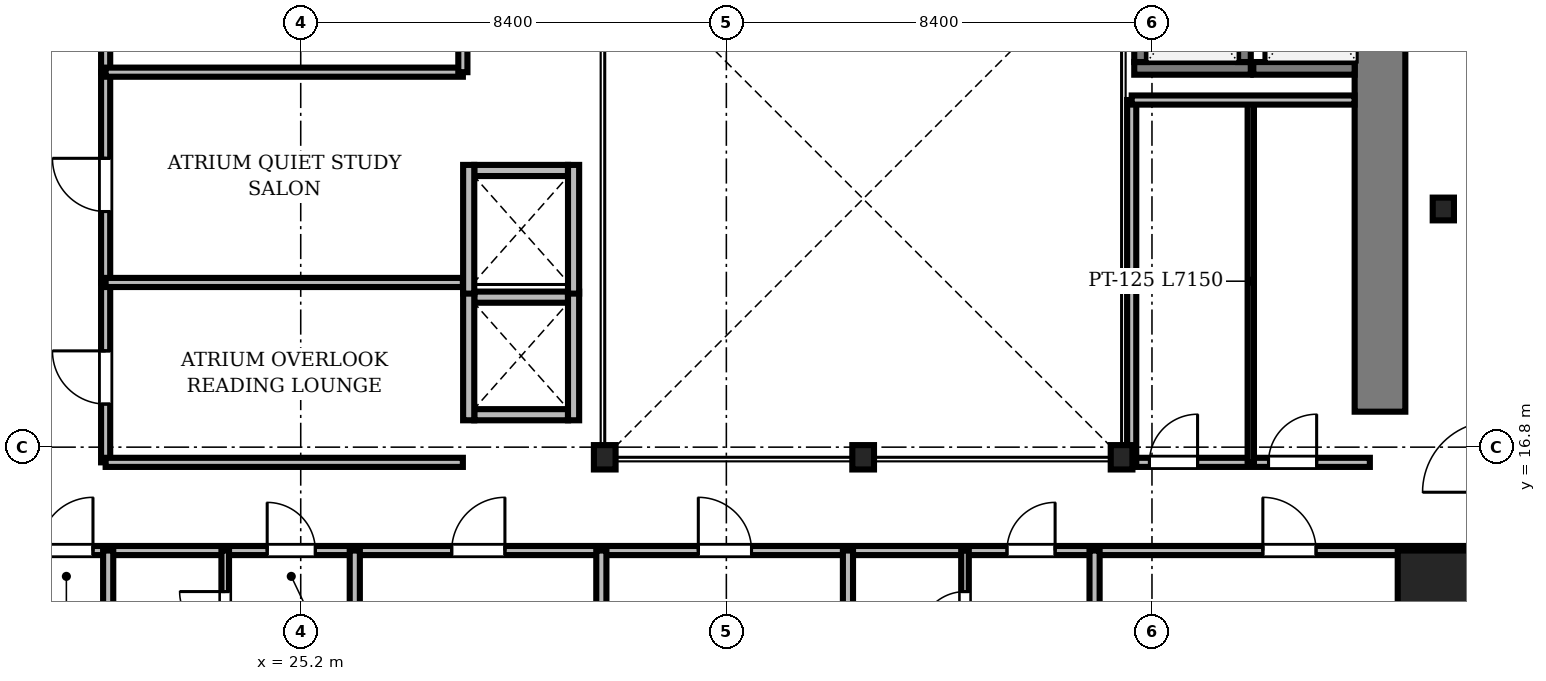
"""IFC4 building model, lengths in metres.
Left out: names, types, materials, properties, quantities, classifications, styles, units other than length and angle.
Written with IfcOpenShell. Run it as: python <this file> out.ifc"""

import sys

from ifc_helpers import new_model, si_unit, direction, frame, frame_2d, origin, origin_2d, place, context, subcontext, project, spatial, rectangle, i_section, extrude, source, transform, mapped, element, fill, save


model = new_model("IFC4")
c1 = context("Model", 3, precision=1e-05, world=origin(), true_north=direction((0.0, 1.0)))
c2 = subcontext(c1, "Body", "Model", "MODEL_VIEW")
j1 = project(units=[si_unit("LENGTHUNIT", "METRE"), si_unit("PLANEANGLEUNIT", "RADIAN")], contexts=[c1])
p1 = place(None, origin())
s1 = spatial("IfcSite", under=j1, at=p1, CompositionType="ELEMENT")
p2 = place(p1, origin())
s2 = spatial("IfcBuilding", under=s1, at=p2, CompositionType="ELEMENT")
p3 = place(p2, frame((0.0, 0.0, 45.85)))
s3 = spatial("IfcBuildingStorey", under=s2, at=p3, CompositionType="ELEMENT", Elevation=45.85)
m1 = source(origin(), c2, "Body", "SweptSolid", [
    extrude(rectangle(XDim=13.15, YDim=1.0, at=frame_2d((6.575, 0.0))), origin(), (0.0, 0.0, 1.0), 3.41),
])
p4 = place(p3, frame((46.5, 17.5, 0.0), z_axis=(0.0, 0.0, 1.0), x_axis=(0.0, 1.0, 0.0)))
e1 = element("IfcWall", 1, at=p4, inside=s3, PredefinedType="SHEAR", context=c2, shape_type="MappedRepresentation", body=[
    mapped(m1, transform((0.0, 0.0, 0.0), scale=1.0)),
])
m2 = source(origin(), c2, "Body", "SweptSolid", [
    extrude(i_section(OverallWidth=0.428, OverallDepth=0.481, WebThickness=0.04, FlangeThickness=0.063, FilletRadius=0.015, at=origin_2d()), origin(), (0.0, 0.0, 1.0), 3.41),
])
for number, where, z_axis, x_axis in (
    (2, (31.2, 16.6, 0.0), (0.0, 0.0, 1.0), (1.0, 0.0, 0.0)),
    (3, (36.3, 16.6, 0.0), (0.0, 0.0, 1.0), (1.0, 0.0, 0.0)),
    (4, (41.4, 16.6, 0.0), (0.0, 0.0, 1.0), (1.0, 0.0, 0.0)),
):
    element("IfcColumn", number, at=place(p3, frame(where, z_axis=z_axis, x_axis=x_axis)), inside=s3, PredefinedType="COLUMN", context=c2, shape_type="MappedRepresentation", body=[
        mapped(m2, transform((0.0, 0.0, 0.0), scale=1.0)),
    ])
m3 = source(origin(), c2, "Body", "SweptSolid", [
    extrude(rectangle(XDim=1.8, YDim=1.8, at=origin_2d()), origin(), (0.0, 0.0, 1.0), 3.41),
])
p5 = place(p3, frame((47.75, 13.86, 0.0), z_axis=(0.0, 0.0, 1.0), x_axis=(1.0, 0.0, 0.0)))
e5 = element("IfcColumn", 5, at=p5, inside=s3, PredefinedType="COLUMN", context=c2, shape_type="MappedRepresentation", body=[
    mapped(m3, transform((0.0, 0.0, 0.0), scale=1.0)),
])
m4 = source(origin(), c2, "Body", "SweptSolid", [
    extrude(i_section(OverallWidth=0.419, OverallDepth=0.449, WebThickness=0.031, FlangeThickness=0.048, FilletRadius=0.015, at=origin_2d()), origin(), (0.0, 0.0, 1.0), 3.41),
])
p6 = place(p3, frame((47.75, 21.5, 0.0), z_axis=(0.0, 0.0, 1.0), x_axis=(1.0, 0.0, 0.0)))
e6 = element("IfcColumn", 6, at=p6, inside=s3, PredefinedType="COLUMN", context=c2, shape_type="MappedRepresentation", body=[
    mapped(m4, transform((0.0, 0.0, 0.0), scale=1.0)),
])
m5 = source(origin(), c2, "Body", "SweptSolid", [
    extrude(rectangle(XDim=1.85, YDim=0.22, at=frame_2d((0.925, 0.0))), origin(), (0.0, 0.0, 1.0), 3.41),
])
for number, where, z_axis, x_axis in (
    (7, (28.625, 17.44, 0.0), (0.0, 0.0, 1.0), (1.0, 0.0, 0.0)),
    (8, (28.625, 19.76, 0.0), (0.0, 0.0, 1.0), (1.0, 0.0, 0.0)),
):
    element("IfcWall", number, at=place(p3, frame(where, z_axis=z_axis, x_axis=x_axis)), inside=s3, PredefinedType="SOLIDWALL", context=c2, shape_type="MappedRepresentation", body=[
        mapped(m5, transform((0.0, 0.0, 0.0), scale=1.0)),
    ])
m6 = source(origin(), c2, "Body", "SweptSolid", [
    extrude(rectangle(XDim=2.54, YDim=0.22, at=frame_2d((1.27, 0.0))), origin(), (0.0, 0.0, 1.0), 3.41),
])
for number, where, z_axis, x_axis in (
    (9, (28.515, 17.33, 0.0), (0.0, 0.0, 1.0), (0.0, 1.0, 0.0)),
    (10, (30.585, 17.33, 0.0), (0.0, 0.0, 1.0), (0.0, 1.0, 0.0)),
):
    element("IfcWall", number, at=place(p3, frame(where, z_axis=z_axis, x_axis=x_axis)), inside=s3, PredefinedType="SOLIDWALL", context=c2, shape_type="MappedRepresentation", body=[
        mapped(m6, transform((0.0, 0.0, 0.0), scale=1.0)),
    ])
p7 = place(p3, frame((28.625, 22.26, 0.0), z_axis=(0.0, 0.0, 1.0), x_axis=(1.0, 0.0, 0.0)))
e11 = element("IfcWall", 11, at=p7, inside=s3, PredefinedType="SOLIDWALL", context=c2, shape_type="MappedRepresentation", body=[
    mapped(m5, transform((0.0, 0.0, 0.0), scale=1.0)),
])
for number, where, z_axis, x_axis in (
    (12, (28.515, 19.83, 0.0), (0.0, 0.0, 1.0), (0.0, 1.0, 0.0)),
    (13, (30.585, 19.83, 0.0), (0.0, 0.0, 1.0), (0.0, 1.0, 0.0)),
):
    element("IfcWall", number, at=place(p3, frame(where, z_axis=z_axis, x_axis=x_axis)), inside=s3, PredefinedType="SOLIDWALL", context=c2, shape_type="MappedRepresentation", body=[
        mapped(m6, transform((0.0, 0.0, 0.0), scale=1.0)),
    ])
m7 = source(origin(), c2, "Body", "SweptSolid", [
    extrude(rectangle(XDim=2.3, YDim=0.25, at=frame_2d((1.15, 0.0))), origin(), (0.0, 0.0, 1.0), 3.41),
])
for number, where, z_axis, x_axis in (
    (14, (41.65, 24.275, 0.0), (0.0, 0.0, 1.0), (1.0, 0.0, 0.0)),
    (15, (41.775, 24.4, 0.0), (0.0, 0.0, 1.0), (0.0, 1.0, 0.0)),
    (16, (43.825, 24.4, 0.0), (0.0, 0.0, 1.0), (0.0, 1.0, 0.0)),
):
    element("IfcWall", number, at=place(p3, frame(where, z_axis=z_axis, x_axis=x_axis)), inside=s3, PredefinedType="SOLIDWALL", context=c2, shape_type="MappedRepresentation", body=[
        mapped(m7, transform((0.0, 0.0, 0.0), scale=1.0)),
    ])
m8 = source(origin(), c2, "Body", "SweptSolid", [
    extrude(rectangle(XDim=2.0, YDim=0.25, at=frame_2d((1.0, 0.0))), origin(), (0.0, 0.0, 1.0), 3.41),
])
p8 = place(p3, frame((44.0, 24.275, 0.0), z_axis=(0.0, 0.0, 1.0), x_axis=(1.0, 0.0, 0.0)))
e17 = element("IfcWall", 17, at=p8, inside=s3, PredefinedType="SOLIDWALL", context=c2, shape_type="MappedRepresentation", body=[
    mapped(m8, transform((0.0, 0.0, 0.0), scale=1.0)),
])
m9 = source(origin(), c2, "Body", "SweptSolid", [
    extrude(rectangle(XDim=46.156, YDim=0.18, at=frame_2d((23.078, 0.0))), origin(), (0.0, 0.0, 1.0), 2.652),
])
p9 = place(p3, frame((2.422, 14.76, 0.0), z_axis=(0.0, 0.0, 1.0), x_axis=(1.0, 0.0, 0.0)))
e18 = element("IfcWall", 18, at=p9, inside=s3, PredefinedType="PARTITIONING", context=c2, shape_type="MappedRepresentation", body=[
    mapped(m9, transform((0.0, 0.0, 0.0), scale=1.0)),
])
m10 = source(origin(), c2, "Body", "SweptSolid", [
    extrude(rectangle(XDim=1.05, YDim=2.2, at=frame_2d((0.525, 1.1))), frame((0.0, 0.1, 0.0), z_axis=(0.0, -1.0, 0.0), x_axis=(1.0, 0.0, 0.0)), (0.0, 0.0, 1.0), 0.2),
])
p10 = place(p9, frame((17.628, 0.0, 0.0)))
e19 = element("IfcOpeningElement", 19, at=p10, cuts=e18, PredefinedType="OPENING", context=c2, shape_type="MappedRepresentation", body=[
    mapped(m10, transform((0.0, 0.0, 0.0), scale=1.0)),
])
m11 = source(origin(), c2, "Body", "SweptSolid", [
    extrude(rectangle(XDim=0.95, YDim=2.15, at=frame_2d((0.475, 1.075))), frame((0.0, 0.1, 0.0), z_axis=(0.0, -1.0, 0.0), x_axis=(1.0, 0.0, 0.0)), (0.0, 0.0, 1.0), 0.2),
])
p11 = place(p9, frame((22.116, 0.0, 0.0)))
e20 = element("IfcOpeningElement", 20, at=p11, cuts=e18, PredefinedType="OPENING", context=c2, shape_type="MappedRepresentation", body=[
    mapped(m11, transform((0.0, 0.0, 0.0), scale=1.0)),
])
p12 = place(p9, frame((25.758, 0.0, 0.0)))
e21 = element("IfcOpeningElement", 21, at=p12, cuts=e18, PredefinedType="OPENING", context=c2, shape_type="MappedRepresentation", body=[
    mapped(m10, transform((0.0, 0.0, 0.0), scale=1.0)),
])
p13 = place(p9, frame((30.625, 0.0, 0.0)))
e22 = element("IfcOpeningElement", 22, at=p13, cuts=e18, PredefinedType="OPENING", context=c2, shape_type="MappedRepresentation", body=[
    mapped(m10, transform((0.0, 0.0, 0.0), scale=1.0)),
])
p14 = place(p9, frame((36.716, 0.0, 0.0)))
e23 = element("IfcOpeningElement", 23, at=p14, cuts=e18, PredefinedType="OPENING", context=c2, shape_type="MappedRepresentation", body=[
    mapped(m11, transform((0.0, 0.0, 0.0), scale=1.0)),
])
p15 = place(p9, frame((41.766, 0.0, 0.0)))
e24 = element("IfcOpeningElement", 24, at=p15, cuts=e18, PredefinedType="OPENING", context=c2, shape_type="MappedRepresentation", body=[
    mapped(m10, transform((0.0, 0.0, 0.0), scale=1.0)),
])
m12 = source(origin(), c2, "Body", "SweptSolid", [
    extrude(rectangle(XDim=4.7, YDim=0.18, at=frame_2d((2.35, 0.0))), origin(), (0.0, 0.0, 1.0), 2.802),
])
p16 = place(p3, frame((41.6, 16.5, 0.0), z_axis=(0.0, 0.0, 1.0), x_axis=(1.0, 0.0, 0.0)))
e25 = element("IfcWall", 25, at=p16, inside=s3, PredefinedType="PARTITIONING", context=c2, shape_type="MappedRepresentation", body=[
    mapped(m12, transform((0.0, 0.0, 0.0), scale=1.0)),
])
p17 = place(p16, frame((0.35, 0.0, 0.0)))
e26 = element("IfcOpeningElement", 26, at=p17, cuts=e25, PredefinedType="OPENING", context=c2, shape_type="MappedRepresentation", body=[
    mapped(m11, transform((0.0, 0.0, 0.0), scale=1.0)),
])
p18 = place(p16, frame((2.7, 0.0, 0.0)))
e27 = element("IfcOpeningElement", 27, at=p18, cuts=e25, PredefinedType="OPENING", context=c2, shape_type="MappedRepresentation", body=[
    mapped(m11, transform((0.0, 0.0, 0.0), scale=1.0)),
])
m13 = source(origin(), c2, "Body", "SweptSolid", [
    extrude(rectangle(XDim=4.24, YDim=0.18, at=frame_2d((2.12, 0.0))), origin(), (0.0, 0.0, 1.0), 2.802),
])
p19 = place(p3, frame((21.35, 24.2, 0.0), z_axis=(0.0, 0.0, 1.0), x_axis=(0.0, 1.0, 0.0)))
e28 = element("IfcWall", 28, at=p19, inside=s3, PredefinedType="PARTITIONING", context=c2, shape_type="MappedRepresentation", body=[
    mapped(m13, transform((0.0, 0.0, 0.0), scale=1.0)),
])
p20 = place(p19, frame((1.4, 0.0, 0.0)))
e29 = element("IfcOpeningElement", 29, at=p20, cuts=e28, PredefinedType="OPENING", context=c2, shape_type="MappedRepresentation", body=[
    mapped(m10, transform((0.0, 0.0, 0.0), scale=1.0)),
])
m14 = source(origin(), c2, "Body", "SweptSolid", [
    extrude(rectangle(XDim=4.15, YDim=0.18, at=frame_2d((2.075, 0.0))), origin(), (0.0, 0.0, 1.0), 3.042),
])
p21 = place(p3, frame((21.35, 20.05, 0.0), z_axis=(0.0, 0.0, 1.0), x_axis=(0.0, 1.0, 0.0)))
e30 = element("IfcWall", 30, at=p21, inside=s3, PredefinedType="PARTITIONING", context=c2, shape_type="MappedRepresentation", body=[
    mapped(m14, transform((0.0, 0.0, 0.0), scale=1.0)),
])
p22 = place(p21, frame((1.4, 0.0, 0.0)))
e31 = element("IfcOpeningElement", 31, at=p22, cuts=e30, PredefinedType="OPENING", context=c2, shape_type="MappedRepresentation", body=[
    mapped(m10, transform((0.0, 0.0, 0.0), scale=1.0)),
])
m15 = source(origin(), c2, "Body", "SweptSolid", [
    extrude(rectangle(XDim=3.55, YDim=0.18, at=frame_2d((1.775, 0.0))), origin(), (0.0, 0.0, 1.0), 2.802),
])
p23 = place(p3, frame((21.35, 16.5, 0.0), z_axis=(0.0, 0.0, 1.0), x_axis=(0.0, 1.0, 0.0)))
e32 = element("IfcWall", 32, at=p23, inside=s3, PredefinedType="PARTITIONING", context=c2, shape_type="MappedRepresentation", body=[
    mapped(m15, transform((0.0, 0.0, 0.0), scale=1.0)),
])
p24 = place(p23, frame((1.15, 0.0, 0.0)))
e33 = element("IfcOpeningElement", 33, at=p24, cuts=e32, PredefinedType="OPENING", context=c2, shape_type="MappedRepresentation", body=[
    mapped(m10, transform((0.0, 0.0, 0.0), scale=1.0)),
])
m16 = source(origin(), c2, "Body", "SweptSolid", [
    extrude(rectangle(XDim=2.36, YDim=0.15, at=frame_2d((1.18, 0.0))), origin(), (0.0, 0.0, 1.0), 3.41),
])
p25 = place(p3, frame((23.71, 12.4, 0.0), z_axis=(0.0, 0.0, 1.0), x_axis=(0.0, 1.0, 0.0)))
e34 = element("IfcWall", 34, at=p25, inside=s3, PredefinedType="PARTITIONING", context=c2, shape_type="MappedRepresentation", body=[
    mapped(m16, transform((0.0, 0.0, 0.0), scale=1.0)),
])
m17 = source(origin(), c2, "Body", "SweptSolid", [
    extrude(rectangle(XDim=0.9, YDim=2.1, at=frame_2d((0.45, 1.05))), frame((0.0, 0.085, 0.0), z_axis=(0.0, -1.0, 0.0), x_axis=(1.0, 0.0, 0.0)), (0.0, 0.0, 1.0), 0.17),
])
p26 = place(p25, frame((0.65, 0.0, 0.0)))
e35 = element("IfcOpeningElement", 35, at=p26, cuts=e34, PredefinedType="OPENING", context=c2, shape_type="MappedRepresentation", body=[
    mapped(m17, transform((0.0, 0.0, 0.0), scale=1.0)),
])
p27 = place(p3, frame((38.31, 12.4, 0.0), z_axis=(0.0, 0.0, 1.0), x_axis=(0.0, 1.0, 0.0)))
e36 = element("IfcWall", 36, at=p27, inside=s3, PredefinedType="PARTITIONING", context=c2, shape_type="MappedRepresentation", body=[
    mapped(m16, transform((0.0, 0.0, 0.0), scale=1.0)),
])
p28 = place(p27, frame((0.65, 0.0, 0.0)))
e37 = element("IfcOpeningElement", 37, at=p28, cuts=e36, PredefinedType="OPENING", context=c2, shape_type="MappedRepresentation", body=[
    mapped(m17, transform((0.0, 0.0, 0.0), scale=1.0)),
])
m18 = source(origin(), c2, "Body", "SweptSolid", [
    extrude(rectangle(XDim=12.638, YDim=0.2, at=frame_2d((6.319, 0.0))), origin(), (0.0, 0.0, 1.0), 2.652),
])
p29 = place(p3, frame((21.4, 2.122, 0.0), z_axis=(0.0, 0.0, 1.0), x_axis=(0.0, 1.0, 0.0)))
e38 = element("IfcWall", 38, at=p29, inside=s3, PredefinedType="PARTITIONING", context=c2, shape_type="MappedRepresentation", body=[
    mapped(m18, transform((0.0, 0.0, 0.0), scale=1.0)),
])
m19 = source(origin(), c2, "Body", "SweptSolid", [
    extrude(rectangle(XDim=12.83, YDim=0.2, at=frame_2d((6.415, 0.0))), origin(), (0.0, 0.0, 1.0), 2.652),
])
p30 = place(p3, frame((26.267, 1.93, 0.0), z_axis=(0.0, 0.0, 1.0), x_axis=(0.0, 1.0, 0.0)))
e39 = element("IfcWall", 39, at=p30, inside=s3, PredefinedType="PARTITIONING", context=c2, shape_type="MappedRepresentation", body=[
    mapped(m19, transform((0.0, 0.0, 0.0), scale=1.0)),
])
for number, where, z_axis, x_axis in (
    (40, (31.133, 2.122, 0.0), (0.0, 0.0, 1.0), (0.0, 1.0, 0.0)),
    (41, (36.0, 2.122, 0.0), (0.0, 0.0, 1.0), (0.0, 1.0, 0.0)),
    (42, (40.867, 2.122, 0.0), (0.0, 0.0, 1.0), (0.0, 1.0, 0.0)),
):
    element("IfcWall", number, at=place(p3, frame(where, z_axis=z_axis, x_axis=x_axis)), inside=s3, PredefinedType="PARTITIONING", context=c2, shape_type="MappedRepresentation", body=[
        mapped(m18, transform((0.0, 0.0, 0.0), scale=1.0)),
    ])
m20 = source(origin(), c2, "Body", "SweptSolid", [
    extrude(rectangle(XDim=7.15, YDim=0.18, at=frame_2d((3.575, 0.0))), origin(), (0.0, 0.0, 1.0), 2.802),
])
p31 = place(p3, frame((41.6, 16.5, 0.0), z_axis=(0.0, 0.0, 1.0), x_axis=(0.0, 1.0, 0.0)))
e43 = element("IfcWall", 43, at=p31, inside=s3, PredefinedType="PARTITIONING", context=c2, shape_type="MappedRepresentation", body=[
    mapped(m20, transform((0.0, 0.0, 0.0), scale=1.0)),
])
m21 = source(origin(), c2, "Body", "SweptSolid", [
    extrude(rectangle(XDim=7.15, YDim=0.125, at=frame_2d((3.575, 0.0))), origin(), (0.0, 0.0, 1.0), 2.802),
])
p32 = place(p3, frame((43.95, 16.5, 0.0), z_axis=(0.0, 0.0, 1.0), x_axis=(0.0, 1.0, 0.0)))
e44 = element("IfcWall", 44, at=p32, inside=s3, PredefinedType="PARTITIONING", context=c2, shape_type="MappedRepresentation", body=[
    mapped(m21, transform((0.0, 0.0, 0.0), scale=1.0)),
])
m22 = source(origin(), c2, "Body", "SweptSolid", [
    extrude(rectangle(XDim=7.05, YDim=0.18, at=frame_2d((3.525, 0.0))), origin(), (0.0, 0.0, 1.0), 2.802),
])
p33 = place(p3, frame((21.35, 16.5, 0.0), z_axis=(0.0, 0.0, 1.0), x_axis=(1.0, 0.0, 0.0)))
e45 = element("IfcWall", 45, at=p33, inside=s3, PredefinedType="PARTITIONING", context=c2, shape_type="MappedRepresentation", body=[
    mapped(m22, transform((0.0, 0.0, 0.0), scale=1.0)),
])
m23 = source(origin(), c2, "Body", "SweptSolid", [
    extrude(rectangle(XDim=7.05, YDim=0.18, at=frame_2d((3.525, 0.0))), origin(), (0.0, 0.0, 1.0), 3.41),
])
for number, where, z_axis, x_axis in (
    (46, (21.35, 20.05, 0.0), (0.0, 0.0, 1.0), (1.0, 0.0, 0.0)),
    (47, (21.35, 24.2, 0.0), (0.0, 0.0, 1.0), (1.0, 0.0, 0.0)),
):
    element("IfcWall", number, at=place(p3, frame(where, z_axis=z_axis, x_axis=x_axis)), inside=s3, PredefinedType="PARTITIONING", context=c2, shape_type="MappedRepresentation", body=[
        mapped(m23, transform((0.0, 0.0, 0.0), scale=1.0)),
    ])
m24 = source(origin(), c2, "Body", "SweptSolid", [
    extrude(rectangle(XDim=4.398, YDim=0.18, at=frame_2d((2.199, 0.0))), origin(), (0.0, 0.0, 1.0), 3.41),
])
p34 = place(p3, frame((41.6, 23.65, 0.0), z_axis=(0.0, 0.0, 1.0), x_axis=(1.0, 0.0, 0.0)))
e48 = element("IfcWall", 48, at=p34, inside=s3, PredefinedType="PARTITIONING", context=c2, shape_type="MappedRepresentation", body=[
    mapped(m24, transform((0.0, 0.0, 0.0), scale=1.0)),
])
p35 = place(p3, frame((28.4, 24.2, 0.0), z_axis=(0.0, 0.0, 1.0), x_axis=(0.0, 1.0, 0.0)))
e49 = element("IfcWall", 49, at=p35, inside=s3, PredefinedType="PARTITIONING", context=c2, shape_type="MappedRepresentation", body=[
    mapped(m13, transform((0.0, 0.0, 0.0), scale=1.0)),
])
m25 = source(origin(), c2, "Body", "SweptSolid", [
    extrude(rectangle(XDim=1.05, YDim=2.2, at=frame_2d((0.525, 1.1))), frame((0.0, 0.025, 0.0), z_axis=(0.0, -1.0, 0.0), x_axis=(1.0, 0.0, 0.0)), (0.0, 0.0, 1.0), 0.05),
])
p36 = place(p10, origin())
e50 = element("IfcDoor", 50, at=p36, inside=s3, OperationType="SINGLE_SWING_RIGHT", PredefinedType="DOOR", context=c2, shape_type="MappedRepresentation", body=[
    mapped(m25, transform((0.0, 0.0, 0.0), scale=1.0)),
])
fill(e19, e50)
m26 = source(origin(), c2, "Body", "SweptSolid", [
    extrude(rectangle(XDim=0.95, YDim=2.15, at=frame_2d((0.475, 1.075))), frame((0.0, 0.025, 0.0), z_axis=(0.0, -1.0, 0.0), x_axis=(1.0, 0.0, 0.0)), (0.0, 0.0, 1.0), 0.05),
])
p37 = place(p11, origin())
e51 = element("IfcDoor", 51, at=p37, inside=s3, OperationType="SINGLE_SWING_LEFT", PredefinedType="DOOR", context=c2, shape_type="MappedRepresentation", body=[
    mapped(m26, transform((0.0, 0.0, 0.0), scale=1.0)),
])
fill(e20, e51)
p38 = place(p12, origin())
e52 = element("IfcDoor", 52, at=p38, inside=s3, OperationType="SINGLE_SWING_RIGHT", PredefinedType="DOOR", context=c2, shape_type="MappedRepresentation", body=[
    mapped(m25, transform((0.0, 0.0, 0.0), scale=1.0)),
])
fill(e21, e52)
p39 = place(p13, origin())
e53 = element("IfcDoor", 53, at=p39, inside=s3, OperationType="SINGLE_SWING_LEFT", PredefinedType="DOOR", context=c2, shape_type="MappedRepresentation", body=[
    mapped(m25, transform((0.0, 0.0, 0.0), scale=1.0)),
])
fill(e22, e53)
p40 = place(p14, origin())
e54 = element("IfcDoor", 54, at=p40, inside=s3, OperationType="SINGLE_SWING_RIGHT", PredefinedType="DOOR", context=c2, shape_type="MappedRepresentation", body=[
    mapped(m26, transform((0.0, 0.0, 0.0), scale=1.0)),
])
fill(e23, e54)
p41 = place(p15, origin())
e55 = element("IfcDoor", 55, at=p41, inside=s3, OperationType="SINGLE_SWING_LEFT", PredefinedType="DOOR", context=c2, shape_type="MappedRepresentation", body=[
    mapped(m25, transform((0.0, 0.0, 0.0), scale=1.0)),
])
fill(e24, e55)
p42 = place(p17, origin())
e56 = element("IfcDoor", 56, at=p42, inside=s3, OperationType="SINGLE_SWING_RIGHT", PredefinedType="DOOR", context=c2, shape_type="MappedRepresentation", body=[
    mapped(m26, transform((0.0, 0.0, 0.0), scale=1.0)),
])
fill(e26, e56)
p43 = place(p18, origin())
e57 = element("IfcDoor", 57, at=p43, inside=s3, OperationType="SINGLE_SWING_RIGHT", PredefinedType="DOOR", context=c2, shape_type="MappedRepresentation", body=[
    mapped(m26, transform((0.0, 0.0, 0.0), scale=1.0)),
])
fill(e27, e57)
p44 = place(p22, origin())
e58 = element("IfcDoor", 58, at=p44, inside=s3, OperationType="SINGLE_SWING_RIGHT", PredefinedType="DOOR", context=c2, shape_type="MappedRepresentation", body=[
    mapped(m25, transform((0.0, 0.0, 0.0), scale=1.0)),
])
fill(e31, e58)
p45 = place(p24, origin())
e59 = element("IfcDoor", 59, at=p45, inside=s3, OperationType="SINGLE_SWING_RIGHT", PredefinedType="DOOR", context=c2, shape_type="MappedRepresentation", body=[
    mapped(m25, transform((0.0, 0.0, 0.0), scale=1.0)),
])
fill(e33, e59)
m27 = source(origin(), c2, "Body", "SweptSolid", [
    extrude(rectangle(XDim=0.9, YDim=2.1, at=frame_2d((0.45, 1.05))), frame((0.0, 0.025, 0.0), z_axis=(0.0, -1.0, 0.0), x_axis=(1.0, 0.0, 0.0)), (0.0, 0.0, 1.0), 0.05),
])
p46 = place(p26, origin())
e60 = element("IfcDoor", 60, at=p46, inside=s3, OperationType="SINGLE_SWING_RIGHT", PredefinedType="DOOR", context=c2, shape_type="MappedRepresentation", body=[
    mapped(m27, transform((0.0, 0.0, 0.0), scale=1.0)),
])
fill(e35, e60)
p47 = place(p28, origin())
e61 = element("IfcDoor", 61, at=p47, inside=s3, OperationType="SINGLE_SWING_LEFT", PredefinedType="DOOR", context=c2, shape_type="MappedRepresentation", body=[
    mapped(m27, transform((0.0, 0.0, 0.0), scale=1.0)),
])
fill(e37, e61)
save(model, sys.argv[1])
